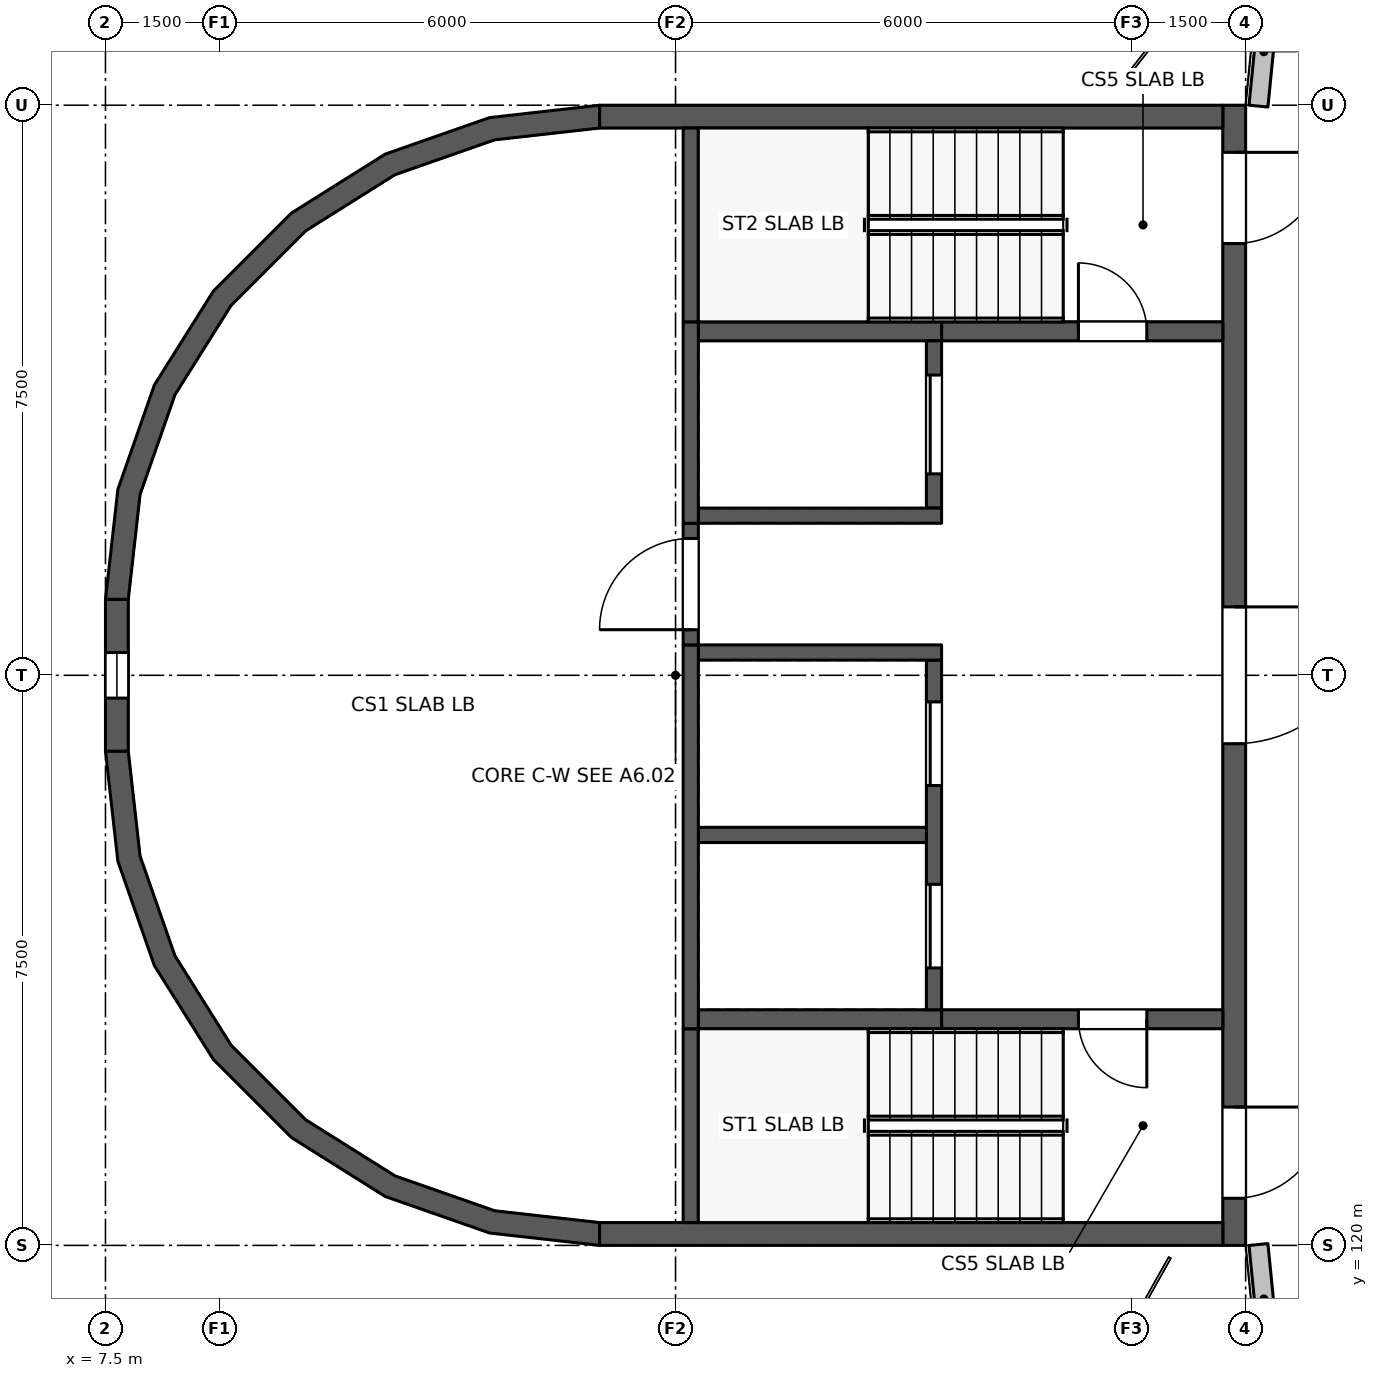
"""IFC4 building model, lengths in metres.
Left out: names, types, materials, properties, quantities, classifications, styles, units other than length and angle.
Written with IfcOpenShell. Run it as: python <this file> out.ifc"""

import sys

from ifc_helpers import new_model, si_unit, direction, frame, frame_2d, origin, place, context, subcontext, project, spatial, polyline, rectangle, outline, extrude, element, fill, save


model = new_model("IFC4")
c1 = context("Model", 3, precision=1e-05, world=origin(), true_north=direction((0.0, 1.0)))
c2 = subcontext(c1, "Body", "Model", "MODEL_VIEW")
j1 = project(units=[si_unit("LENGTHUNIT", "METRE"), si_unit("PLANEANGLEUNIT", "RADIAN")], contexts=[c1])
p1 = place(None, origin())
s1 = spatial("IfcSite", under=j1, at=p1, CompositionType="ELEMENT")
p2 = place(p1, origin())
s2 = spatial("IfcBuilding", under=s1, at=p2, CompositionType="ELEMENT")
p3 = place(p2, frame((0.0, 0.0, 3.3)))
s3 = spatial("IfcBuildingStorey", under=s2, at=p3, CompositionType="ELEMENT", Elevation=3.3)
p4 = place(p3, frame((22.811, 136.421, 0.0), z_axis=(0.0, 0.0, 1.0), x_axis=(-0.098479948823, -0.995139035351, 0.0)))
e1 = element("IfcWall", 1, at=p4, inside=s3, PredefinedType="SOLIDWALL", context=c2, shape_type="SweptSolid", body=[
    extrude(rectangle(XDim=1.44, YDim=0.25, at=frame_2d((0.72, 0.0))), origin(), (0.0, 0.0, 1.0), 1.1),
])
p5 = place(p3, frame((22.669, 120.011, 0.0), z_axis=(0.0, 0.0, 1.0), x_axis=(0.098664443357, -0.995120760319, 0.0)))
e2 = element("IfcWall", 2, at=p5, inside=s3, PredefinedType="SOLIDWALL", context=c2, shape_type="SweptSolid", body=[
    extrude(rectangle(XDim=1.44, YDim=0.25, at=frame_2d((0.72, 0.0))), origin(), (0.0, 0.0, 1.0), 1.1),
])
p6 = place(p3, frame((22.35, 135.0, 0.0), z_axis=(0.0, 0.0, 1.0), x_axis=(0.0, -1.0, 0.0)))
e3 = element("IfcWall", 3, at=p6, inside=s3, PredefinedType="SHEAR", context=c2, shape_type="SweptSolid", body=[
    extrude(rectangle(XDim=15.0, YDim=0.3, at=frame_2d((7.5, 0.0))), origin(), (0.0, 0.0, 1.0), 3.3),
])
p7 = place(p6, frame((13.18, 0.0, 0.0)))
e4 = element("IfcOpeningElement", 4, at=p7, cuts=e3, PredefinedType="OPENING", context=c2, shape_type="SweptSolid", body=[
    extrude(rectangle(XDim=1.2, YDim=2.1, at=frame_2d((0.6, 1.05))), frame((0.0, 0.16, 0.0), z_axis=(0.0, -1.0, 0.0), x_axis=(1.0, 0.0, 0.0)), (0.0, 0.0, 1.0), 0.32),
])
p8 = place(p6, frame((0.62, 0.0, 0.0)))
e5 = element("IfcOpeningElement", 5, at=p8, cuts=e3, PredefinedType="OPENING", context=c2, shape_type="SweptSolid", body=[
    extrude(rectangle(XDim=1.2, YDim=2.1, at=frame_2d((0.6, 1.05))), frame((0.0, 0.16, 0.0), z_axis=(0.0, -1.0, 0.0), x_axis=(1.0, 0.0, 0.0)), (0.0, 0.0, 1.0), 0.32),
])
p9 = place(p6, frame((6.6, 0.0, 0.0)))
e6 = element("IfcOpeningElement", 6, at=p9, cuts=e3, PredefinedType="OPENING", context=c2, shape_type="SweptSolid", body=[
    extrude(rectangle(XDim=1.8, YDim=2.1, at=frame_2d((0.9, 1.05))), frame((0.0, 0.16, 0.0), z_axis=(0.0, -1.0, 0.0), x_axis=(1.0, 0.0, 0.0)), (0.0, 0.0, 1.0), 0.32),
])
p10 = place(p3, frame((7.65, 126.5, 0.0), z_axis=(0.0, 0.0, 1.0), x_axis=(0.0, 1.0, 0.0)))
e7 = element("IfcWall", 7, at=p10, inside=s3, PredefinedType="SHEAR", context=c2, shape_type="SweptSolid", body=[
    extrude(rectangle(XDim=2.0, YDim=0.3, at=frame_2d((1.0, 0.0))), origin(), (0.0, 0.0, 1.0), 3.3),
])
p11 = place(p10, frame((0.7, 0.0, 0.3)))
e8 = element("IfcOpeningElement", 8, at=p11, cuts=e7, PredefinedType="OPENING", context=c2, shape_type="SweptSolid", body=[
    extrude(rectangle(XDim=0.6, YDim=2.7, at=frame_2d((0.3, 1.35))), frame((0.0, 0.16, 0.0), z_axis=(0.0, -1.0, 0.0), x_axis=(1.0, 0.0, 0.0)), (0.0, 0.0, 1.0), 0.32),
])
for number, where, z_axis, x_axis in (
    (9, (22.2, 120.15, 0.0), (0.0, 0.0, 1.0), (-1.0, 0.0, 0.0)),
    (10, (14.0, 134.85, 0.0), (0.0, 0.0, 1.0), (1.0, 0.0, 0.0)),
):
    element("IfcWall", number, at=place(p3, frame(where, z_axis=z_axis, x_axis=x_axis)), inside=s3, PredefinedType="SHEAR", context=c2, shape_type="SweptSolid", body=[
        extrude(rectangle(XDim=8.2, YDim=0.3, at=frame_2d((4.1, 0.0))), origin(), (0.0, 0.0, 1.0), 3.3),
    ])
p12 = place(p3, frame((22.2, 122.975, 0.0), z_axis=(0.0, 0.0, 1.0), x_axis=(-1.0, 0.0, 0.0)))
e11 = element("IfcWall", 11, at=p12, inside=s3, PredefinedType="STANDARD", context=c2, shape_type="SweptSolid", body=[
    extrude(rectangle(XDim=3.7, YDim=0.25, at=frame_2d((1.85, 0.0))), origin(), (0.0, 0.0, 1.0), 3.1),
])
p13 = place(p12, frame((1.0, 0.0, 0.0)))
e12 = element("IfcOpeningElement", 12, at=p13, cuts=e11, PredefinedType="OPENING", context=c2, shape_type="SweptSolid", body=[
    extrude(rectangle(XDim=0.9, YDim=2.1, at=frame_2d((0.45, 1.05))), frame((0.0, 0.135, 0.0), z_axis=(0.0, -1.0, 0.0), x_axis=(1.0, 0.0, 0.0)), (0.0, 0.0, 1.0), 0.27),
])
p14 = place(p3, frame((18.5, 122.975, 0.0), z_axis=(0.0, 0.0, 1.0), x_axis=(-1.0, 0.0, 0.0)))
e13 = element("IfcWall", 13, at=p14, inside=s3, PredefinedType="STANDARD", context=c2, shape_type="SweptSolid", body=[
    extrude(rectangle(XDim=3.2, YDim=0.25, at=frame_2d((1.6, 0.0))), origin(), (0.0, 0.0, 1.0), 3.1),
])
p15 = place(p3, frame((18.5, 132.025, 0.0), z_axis=(0.0, 0.0, 1.0), x_axis=(1.0, 0.0, 0.0)))
e14 = element("IfcWall", 14, at=p15, inside=s3, PredefinedType="STANDARD", context=c2, shape_type="SweptSolid", body=[
    extrude(rectangle(XDim=3.7, YDim=0.25, at=frame_2d((1.85, 0.0))), origin(), (0.0, 0.0, 1.0), 3.1),
])
p16 = place(p15, frame((1.8, 0.0, 0.0)))
e15 = element("IfcOpeningElement", 15, at=p16, cuts=e14, PredefinedType="OPENING", context=c2, shape_type="SweptSolid", body=[
    extrude(rectangle(XDim=0.9, YDim=2.1, at=frame_2d((0.45, 1.05))), frame((0.0, 0.135, 0.0), z_axis=(0.0, -1.0, 0.0), x_axis=(1.0, 0.0, 0.0)), (0.0, 0.0, 1.0), 0.27),
])
p17 = place(p3, frame((18.5, 132.025, 0.0), z_axis=(0.0, 0.0, 1.0), x_axis=(-1.0, 0.0, 0.0)))
e16 = element("IfcWall", 16, at=p17, inside=s3, PredefinedType="STANDARD", context=c2, shape_type="SweptSolid", body=[
    extrude(rectangle(XDim=3.2, YDim=0.25, at=frame_2d((1.6, 0.0))), origin(), (0.0, 0.0, 1.0), 3.1),
])
p18 = place(p3, frame((18.4, 123.1, 0.0), z_axis=(0.0, 0.0, 1.0), x_axis=(0.0, 1.0, 0.0)))
e17 = element("IfcWall", 17, at=p18, inside=s3, PredefinedType="STANDARD", context=c2, shape_type="SweptSolid", body=[
    extrude(rectangle(XDim=4.6, YDim=0.2, at=frame_2d((2.3, 0.0))), origin(), (0.0, 0.0, 1.0), 3.1),
])
p19 = place(p18, frame((0.55, 0.0, 0.0)))
e18 = element("IfcOpeningElement", 18, at=p19, cuts=e17, PredefinedType="OPENING", context=c2, shape_type="SweptSolid", body=[
    extrude(rectangle(XDim=1.1, YDim=2.1, at=frame_2d((0.55, 1.05))), frame((0.0, 0.11, 0.0), z_axis=(0.0, -1.0, 0.0), x_axis=(1.0, 0.0, 0.0)), (0.0, 0.0, 1.0), 0.22),
])
p20 = place(p18, frame((2.95, 0.0, 0.0)))
e19 = element("IfcOpeningElement", 19, at=p20, cuts=e17, PredefinedType="OPENING", context=c2, shape_type="SweptSolid", body=[
    extrude(rectangle(XDim=1.1, YDim=2.1, at=frame_2d((0.55, 1.05))), frame((0.0, 0.11, 0.0), z_axis=(0.0, -1.0, 0.0), x_axis=(1.0, 0.0, 0.0)), (0.0, 0.0, 1.0), 0.22),
])
p21 = place(p3, frame((18.4, 129.7, 0.0), z_axis=(0.0, 0.0, 1.0), x_axis=(0.0, 1.0, 0.0)))
e20 = element("IfcWall", 20, at=p21, inside=s3, PredefinedType="STANDARD", context=c2, shape_type="SweptSolid", body=[
    extrude(rectangle(XDim=2.2, YDim=0.2, at=frame_2d((1.1, 0.0))), origin(), (0.0, 0.0, 1.0), 3.1),
])
p22 = place(p21, frame((0.45, 0.0, 0.0)))
e21 = element("IfcOpeningElement", 21, at=p22, cuts=e20, PredefinedType="OPENING", context=c2, shape_type="SweptSolid", body=[
    extrude(rectangle(XDim=1.3, YDim=2.1, at=frame_2d((0.65, 1.05))), frame((0.0, 0.11, 0.0), z_axis=(0.0, -1.0, 0.0), x_axis=(1.0, 0.0, 0.0)), (0.0, 0.0, 1.0), 0.22),
])
p23 = place(p3, frame((18.3, 125.4, 0.0), z_axis=(0.0, 0.0, 1.0), x_axis=(-1.0, 0.0, 0.0)))
e22 = element("IfcWall", 22, at=p23, inside=s3, PredefinedType="STANDARD", context=c2, shape_type="SweptSolid", body=[
    extrude(rectangle(XDim=3.0, YDim=0.2, at=frame_2d((1.5, 0.0))), origin(), (0.0, 0.0, 1.0), 3.1),
])
for number, where, z_axis, x_axis in (
    (23, (18.5, 127.8, 0.0), (0.0, 0.0, 1.0), (-1.0, 0.0, 0.0)),
    (24, (18.5, 129.6, 0.0), (0.0, 0.0, 1.0), (-1.0, 0.0, 0.0)),
):
    element("IfcWall", number, at=place(p3, frame(where, z_axis=z_axis, x_axis=x_axis)), inside=s3, PredefinedType="STANDARD", context=c2, shape_type="SweptSolid", body=[
        extrude(rectangle(XDim=3.2, YDim=0.2, at=frame_2d((1.6, 0.0))), origin(), (0.0, 0.0, 1.0), 3.1),
    ])
p24 = place(p3, frame((15.2, 120.3, 0.0), z_axis=(0.0, 0.0, 1.0), x_axis=(0.0, 1.0, 0.0)))
e25 = element("IfcWall", 25, at=p24, inside=s3, PredefinedType="STANDARD", context=c2, shape_type="SweptSolid", body=[
    extrude(rectangle(XDim=2.55, YDim=0.2, at=frame_2d((1.275, 0.0))), origin(), (0.0, 0.0, 1.0), 3.1),
])
p25 = place(p3, frame((15.2, 122.85, 0.0), z_axis=(0.0, 0.0, 1.0), x_axis=(0.0, 1.0, 0.0)))
e26 = element("IfcWall", 26, at=p25, inside=s3, PredefinedType="STANDARD", context=c2, shape_type="SweptSolid", body=[
    extrude(rectangle(XDim=5.05, YDim=0.2, at=frame_2d((2.525, 0.0))), origin(), (0.0, 0.0, 1.0), 3.1),
])
p26 = place(p3, frame((15.2, 127.9, 0.0), z_axis=(0.0, 0.0, 1.0), x_axis=(0.0, 1.0, 0.0)))
e27 = element("IfcWall", 27, at=p26, inside=s3, PredefinedType="STANDARD", context=c2, shape_type="SweptSolid", body=[
    extrude(rectangle(XDim=1.6, YDim=0.2, at=frame_2d((0.8, 0.0))), origin(), (0.0, 0.0, 1.0), 3.1),
])
p27 = place(p26, frame((0.2, 0.0, 0.0)))
e28 = element("IfcOpeningElement", 28, at=p27, cuts=e27, PredefinedType="OPENING", context=c2, shape_type="SweptSolid", body=[
    extrude(rectangle(XDim=1.2, YDim=2.1, at=frame_2d((0.6, 1.05))), frame((0.0, 0.11, 0.0), z_axis=(0.0, -1.0, 0.0), x_axis=(1.0, 0.0, 0.0)), (0.0, 0.0, 1.0), 0.22),
])
p28 = place(p3, frame((15.2, 129.5, 0.0), z_axis=(0.0, 0.0, 1.0), x_axis=(0.0, 1.0, 0.0)))
e29 = element("IfcWall", 29, at=p28, inside=s3, PredefinedType="STANDARD", context=c2, shape_type="SweptSolid", body=[
    extrude(rectangle(XDim=2.65, YDim=0.2, at=frame_2d((1.325, 0.0))), origin(), (0.0, 0.0, 1.0), 3.1),
])
p29 = place(p3, frame((15.2, 132.15, 0.0), z_axis=(0.0, 0.0, 1.0), x_axis=(0.0, 1.0, 0.0)))
e30 = element("IfcWall", 30, at=p29, inside=s3, PredefinedType="STANDARD", context=c2, shape_type="SweptSolid", body=[
    extrude(rectangle(XDim=2.55, YDim=0.2, at=frame_2d((1.275, 0.0))), origin(), (0.0, 0.0, 1.0), 3.1),
])
p30 = place(p3, origin())
e31 = element("IfcWall", 31, at=p30, inside=s3, PredefinedType="SHEAR", context=c2, shape_type="SweptSolid", body=[
    extrude(outline(polyline([(14.0, 120.0), (12.554, 120.163), (11.18, 120.644), (9.947, 121.418), (8.918, 122.447), (8.144, 123.68), (7.663, 125.054), (7.5, 126.5), (7.8, 126.5), (7.955, 125.12), (8.414, 123.81), (9.153, 122.635), (10.135, 121.653), (11.31, 120.914), (12.62, 120.455), (14.0, 120.3), (14.0, 120.0)])), origin(), (0.0, 0.0, 1.0), 3.3),
])
p31 = place(p3, origin())
e32 = element("IfcWall", 32, at=p31, inside=s3, PredefinedType="SHEAR", context=c2, shape_type="SweptSolid", body=[
    extrude(outline(polyline([(14.0, 135.0), (12.554, 134.837), (11.18, 134.356), (9.947, 133.582), (8.918, 132.553), (8.144, 131.32), (7.663, 129.946), (7.5, 128.5), (7.8, 128.5), (7.955, 129.88), (8.414, 131.19), (9.153, 132.365), (10.135, 133.347), (11.31, 134.086), (12.62, 134.545), (14.0, 134.7), (14.0, 135.0)])), origin(), (0.0, 0.0, 1.0), 3.3),
])
p32 = place(p7, origin())
e33 = element("IfcDoor", 33, at=p32, inside=s3, OperationType="SINGLE_SWING_RIGHT", PredefinedType="DOOR", context=c2, shape_type="SweptSolid", body=[
    extrude(rectangle(XDim=1.2, YDim=2.1, at=frame_2d((0.6, 1.05))), frame((0.0, 0.025, 0.0), z_axis=(0.0, -1.0, 0.0), x_axis=(1.0, 0.0, 0.0)), (0.0, 0.0, 1.0), 0.05),
])
fill(e4, e33)
p33 = place(p8, origin())
e34 = element("IfcDoor", 34, at=p33, inside=s3, OperationType="SINGLE_SWING_LEFT", PredefinedType="DOOR", context=c2, shape_type="SweptSolid", body=[
    extrude(rectangle(XDim=1.2, YDim=2.1, at=frame_2d((0.6, 1.05))), frame((0.0, 0.025, 0.0), z_axis=(0.0, -1.0, 0.0), x_axis=(1.0, 0.0, 0.0)), (0.0, 0.0, 1.0), 0.05),
])
fill(e5, e34)
p34 = place(p9, origin())
e35 = element("IfcDoor", 35, at=p34, inside=s3, OperationType="DOUBLE_DOOR_SINGLE_SWING", PredefinedType="DOOR", context=c2, shape_type="SweptSolid", body=[
    extrude(rectangle(XDim=1.8, YDim=2.1, at=frame_2d((0.9, 1.05))), frame((0.0, 0.025, 0.0), z_axis=(0.0, -1.0, 0.0), x_axis=(1.0, 0.0, 0.0)), (0.0, 0.0, 1.0), 0.05),
])
fill(e6, e35)
p35 = place(p13, origin())
e36 = element("IfcDoor", 36, at=p35, inside=s3, OperationType="SINGLE_SWING_LEFT", PredefinedType="DOOR", context=c2, shape_type="SweptSolid", body=[
    extrude(rectangle(XDim=0.9, YDim=2.1, at=frame_2d((0.45, 1.05))), frame((0.0, 0.025, 0.0), z_axis=(0.0, -1.0, 0.0), x_axis=(1.0, 0.0, 0.0)), (0.0, 0.0, 1.0), 0.05),
])
fill(e12, e36)
p36 = place(p16, origin())
e37 = element("IfcDoor", 37, at=p36, inside=s3, OperationType="SINGLE_SWING_RIGHT", PredefinedType="DOOR", context=c2, shape_type="SweptSolid", body=[
    extrude(rectangle(XDim=0.9, YDim=2.1, at=frame_2d((0.45, 1.05))), frame((0.0, 0.025, 0.0), z_axis=(0.0, -1.0, 0.0), x_axis=(1.0, 0.0, 0.0)), (0.0, 0.0, 1.0), 0.05),
])
fill(e15, e37)
p37 = place(p19, origin())
e38 = element("IfcDoor", 38, at=p37, inside=s3, OperationType="DOUBLE_DOOR_SLIDING", PredefinedType="DOOR", context=c2, shape_type="SweptSolid", body=[
    extrude(rectangle(XDim=1.1, YDim=2.1, at=frame_2d((0.55, 1.05))), frame((0.0, 0.025, 0.0), z_axis=(0.0, -1.0, 0.0), x_axis=(1.0, 0.0, 0.0)), (0.0, 0.0, 1.0), 0.05),
])
fill(e18, e38)
p38 = place(p20, origin())
e39 = element("IfcDoor", 39, at=p38, inside=s3, OperationType="DOUBLE_DOOR_SLIDING", PredefinedType="DOOR", context=c2, shape_type="SweptSolid", body=[
    extrude(rectangle(XDim=1.1, YDim=2.1, at=frame_2d((0.55, 1.05))), frame((0.0, 0.025, 0.0), z_axis=(0.0, -1.0, 0.0), x_axis=(1.0, 0.0, 0.0)), (0.0, 0.0, 1.0), 0.05),
])
fill(e19, e39)
p39 = place(p22, origin())
e40 = element("IfcDoor", 40, at=p39, inside=s3, OperationType="DOUBLE_DOOR_SLIDING", PredefinedType="DOOR", context=c2, shape_type="SweptSolid", body=[
    extrude(rectangle(XDim=1.3, YDim=2.1, at=frame_2d((0.65, 1.05))), frame((0.0, 0.025, 0.0), z_axis=(0.0, -1.0, 0.0), x_axis=(1.0, 0.0, 0.0)), (0.0, 0.0, 1.0), 0.05),
])
fill(e21, e40)
p40 = place(p27, origin())
e41 = element("IfcDoor", 41, at=p40, inside=s3, OperationType="SINGLE_SWING_RIGHT", PredefinedType="DOOR", context=c2, shape_type="SweptSolid", body=[
    extrude(rectangle(XDim=1.2, YDim=2.1, at=frame_2d((0.6, 1.05))), frame((0.0, 0.025, 0.0), z_axis=(0.0, -1.0, 0.0), x_axis=(1.0, 0.0, 0.0)), (0.0, 0.0, 1.0), 0.05),
])
fill(e28, e41)
p41 = place(p11, origin())
e42 = element("IfcWindow", 42, at=p41, inside=s3, PartitioningType="SINGLE_PANEL", PredefinedType="WINDOW", context=c2, shape_type="SweptSolid", body=[
    extrude(rectangle(XDim=0.6, YDim=2.7, at=frame_2d((0.3, 1.35))), frame((0.0, 0.03, 0.0), z_axis=(0.0, -1.0, 0.0), x_axis=(1.0, 0.0, 0.0)), (0.0, 0.0, 1.0), 0.06),
])
fill(e8, e42)
save(model, sys.argv[1])
